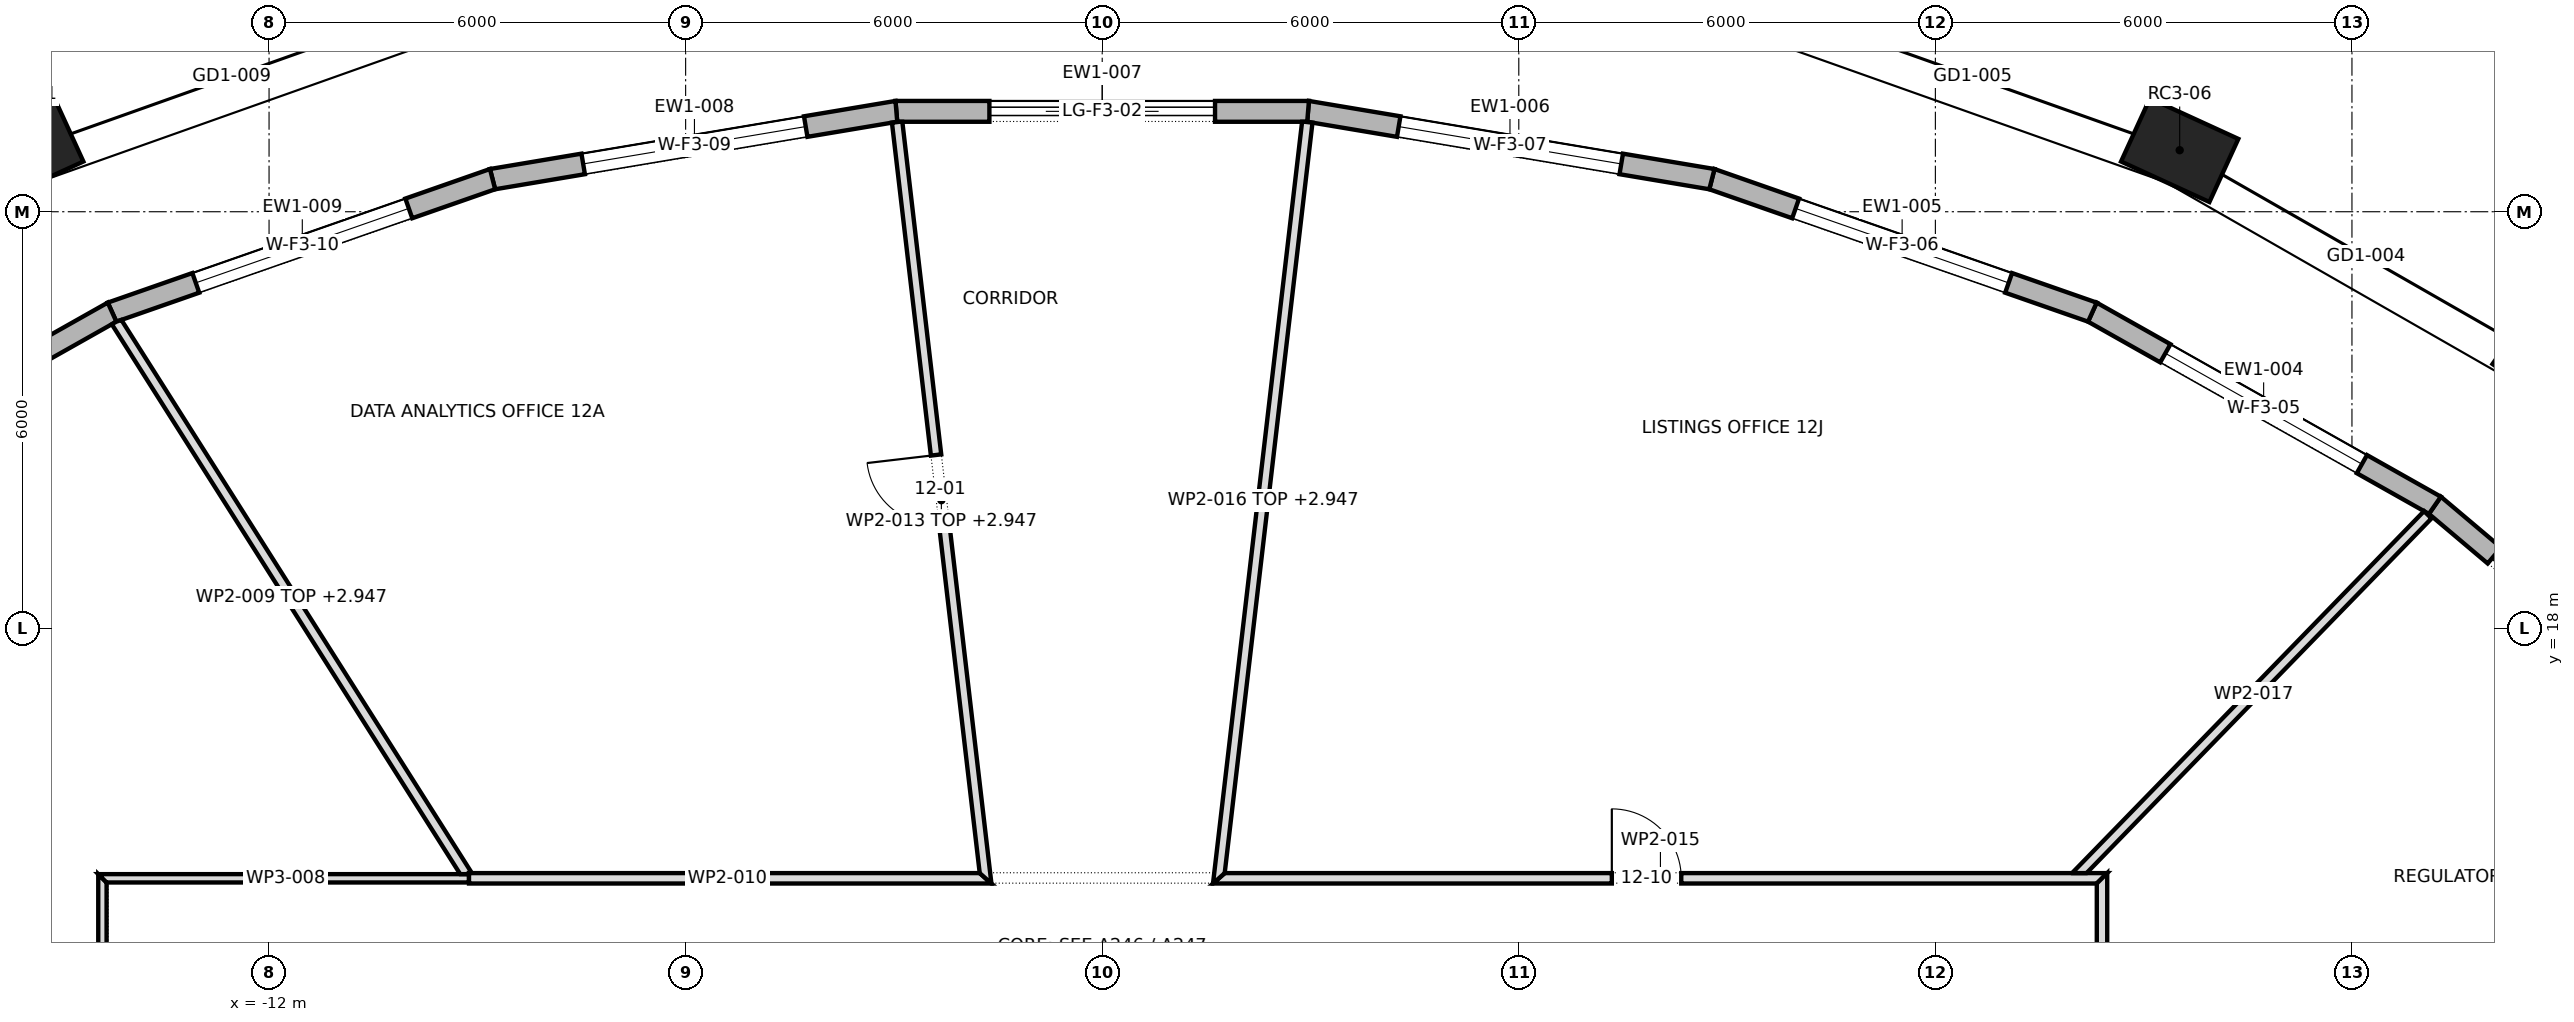
"""IFC4 building model, lengths in metres.
Left out: names, types, materials, properties, quantities, classifications, styles, units other than length and angle.
Written with IfcOpenShell. Run it as: python <this file> out.ifc"""

import sys

from ifc_helpers import new_model, si_unit, direction, frame, frame_2d, origin, origin_2d, place, context, subcontext, project, spatial, polyline, rectangle, outline, extrude, element, fill, save


model = new_model("IFC4")
c1 = context("Model", 3, precision=1e-05, world=origin(), true_north=direction((0.0, 1.0)))
c2 = subcontext(c1, "Body", "Model", "MODEL_VIEW")
j1 = project(units=[si_unit("LENGTHUNIT", "METRE"), si_unit("PLANEANGLEUNIT", "RADIAN")], contexts=[c1])
p1 = place(None, origin())
s1 = spatial("IfcSite", under=j1, at=p1, CompositionType="ELEMENT")
p2 = place(p1, origin())
s2 = spatial("IfcBuilding", under=s1, at=p2, CompositionType="ELEMENT")
p3 = place(p2, frame((0.0, 0.0, 178.9)))
s3 = spatial("IfcBuildingStorey", under=s2, at=p3, CompositionType="ELEMENT", Elevation=178.9)
for number, where, z_axis, x_axis in (
    (1, (20.885, 21.813, 0.0), (0.0, 0.0, 1.0), (-0.818, 0.575, 0.0)),
    (2, (15.519, 24.886, 0.0), (0.0, 0.0, 1.0), (-0.909, 0.417, 0.0)),
    (3, (-15.519, 24.886, 0.0), (0.0, 0.0, 1.0), (-0.909, -0.417, 0.0)),
):
    element("IfcColumn", number, at=place(p3, frame(where, z_axis=z_axis, x_axis=x_axis)), inside=s3, PredefinedType="COLUMN", context=c2, shape_type="SweptSolid", body=[
        extrude(rectangle(XDim=1.4, YDim=1.0, at=origin_2d()), origin(), (0.0, 0.0, 1.0), 4.0),
    ])
p4 = place(p3, frame((23.392, 16.23, 0.0), z_axis=(0.0, 0.0, 1.0), x_axis=(-0.764238764041, 0.64493341636, 0.0)))
e4 = element("IfcWall", 4, at=p4, inside=s3, PredefinedType="STANDARD", context=c2, shape_type="SweptSolid", body=[
    extrude(outline(polyline([(-0.015, -0.15), (5.507, -0.15), (5.478, 0.15), (0.015, 0.15), (-0.015, -0.15)])), origin(), (0.0, 0.0, 1.0), 3.7),
])
p5 = place(p4, frame((1.121, 0.0, 0.0)))
e5 = element("IfcOpeningElement", 5, at=p5, cuts=e4, PredefinedType="OPENING", context=c2, shape_type="SweptSolid", body=[
    extrude(rectangle(XDim=3.25, YDim=3.25, at=frame_2d((1.625, 1.625))), frame((0.0, 0.162, 0.0), z_axis=(0.0, -1.0, 0.0), x_axis=(1.0, 0.0, 0.0)), (0.0, 0.0, 1.0), 0.324),
])
p6 = place(p3, frame((19.195, 19.772, 0.0), z_axis=(0.0, 0.0, 1.0), x_axis=(-0.871077775545, 0.491145099691, 0.0)))
e6 = element("IfcWall", 6, at=p6, inside=s3, PredefinedType="STANDARD", context=c2, shape_type="SweptSolid", body=[
    extrude(outline(polyline([(-0.014, -0.15), (5.677, -0.15), (5.65, 0.15), (0.014, 0.15), (-0.014, -0.15)])), origin(), (0.0, 0.0, 1.0), 3.7),
])
p7 = place(p6, frame((1.207, 0.0, 0.6)))
e7 = element("IfcOpeningElement", 7, at=p7, cuts=e6, PredefinedType="OPENING", context=c2, shape_type="SweptSolid", body=[
    extrude(rectangle(XDim=3.25, YDim=2.65, at=frame_2d((1.625, 1.325))), frame((0.0, 0.162, 0.0), z_axis=(0.0, -1.0, 0.0), x_axis=(1.0, 0.0, 0.0)), (0.0, 0.0, 1.0), 0.324),
])
p8 = place(p3, frame((14.261, 22.554, 0.0), z_axis=(0.0, 0.0, 1.0), x_axis=(-0.943990724372, 0.329971987144, 0.0)))
e8 = element("IfcWall", 8, at=p8, inside=s3, PredefinedType="STANDARD", context=c2, shape_type="SweptSolid", body=[
    extrude(outline(polyline([(-0.013, -0.15), (5.818, -0.15), (5.792, 0.15), (0.013, 0.15), (-0.013, -0.15)])), origin(), (0.0, 0.0, 1.0), 3.7),
])
p9 = place(p8, frame((1.278, 0.0, 0.6)))
e9 = element("IfcOpeningElement", 9, at=p9, cuts=e8, PredefinedType="OPENING", context=c2, shape_type="SweptSolid", body=[
    extrude(rectangle(XDim=3.25, YDim=2.65, at=frame_2d((1.625, 1.325))), frame((0.0, 0.162, 0.0), z_axis=(0.0, -1.0, 0.0), x_axis=(1.0, 0.0, 0.0)), (0.0, 0.0, 1.0), 0.324),
])
p10 = place(p3, frame((8.781, 24.469, 0.0), z_axis=(0.0, 0.0, 1.0), x_axis=(-0.986201934369, 0.165546805001, 0.0)))
e10 = element("IfcWall", 10, at=p10, inside=s3, PredefinedType="STANDARD", context=c2, shape_type="SweptSolid", body=[
    extrude(outline(polyline([(-0.013, -0.15), (5.91, -0.15), (5.885, 0.15), (0.013, 0.15), (-0.013, -0.15)])), origin(), (0.0, 0.0, 1.0), 3.7),
])
p11 = place(p10, frame((1.324, 0.0, 0.6)))
e11 = element("IfcOpeningElement", 11, at=p11, cuts=e10, PredefinedType="OPENING", context=c2, shape_type="SweptSolid", body=[
    extrude(rectangle(XDim=3.25, YDim=2.65, at=frame_2d((1.625, 1.325))), frame((0.0, 0.162, 0.0), z_axis=(0.0, -1.0, 0.0), x_axis=(1.0, 0.0, 0.0)), (0.0, 0.0, 1.0), 0.324),
])
p12 = place(p3, frame((2.965, 25.446, 0.0), z_axis=(0.0, 0.0, 1.0), x_axis=(-1.0, 0.0, 0.0)))
e12 = element("IfcWall", 12, at=p12, inside=s3, PredefinedType="STANDARD", context=c2, shape_type="SweptSolid", body=[
    extrude(outline(polyline([(-0.012, -0.15), (5.942, -0.15), (5.917, 0.15), (0.012, 0.15), (-0.012, -0.15)])), origin(), (0.0, 0.0, 1.0), 3.7),
])
p13 = place(p12, frame((1.34, 0.0, 0.0)))
e13 = element("IfcOpeningElement", 13, at=p13, cuts=e12, PredefinedType="OPENING", context=c2, shape_type="SweptSolid", body=[
    extrude(rectangle(XDim=3.25, YDim=3.25, at=frame_2d((1.625, 1.625))), frame((0.0, 0.162, 0.0), z_axis=(0.0, -1.0, 0.0), x_axis=(1.0, 0.0, 0.0)), (0.0, 0.0, 1.0), 0.324),
])
p14 = place(p3, frame((-2.965, 25.446, 0.0), z_axis=(0.0, 0.0, 1.0), x_axis=(-0.986201934369, -0.165546805001, 0.0)))
e14 = element("IfcWall", 14, at=p14, inside=s3, PredefinedType="STANDARD", context=c2, shape_type="SweptSolid", body=[
    extrude(outline(polyline([(-0.012, -0.15), (5.91, -0.15), (5.885, 0.15), (0.012, 0.15), (-0.012, -0.15)])), origin(), (0.0, 0.0, 1.0), 3.7),
])
p15 = place(p14, frame((1.324, 0.0, 0.6)))
e15 = element("IfcOpeningElement", 15, at=p15, cuts=e14, PredefinedType="OPENING", context=c2, shape_type="SweptSolid", body=[
    extrude(rectangle(XDim=3.25, YDim=2.65, at=frame_2d((1.625, 1.325))), frame((0.0, 0.162, 0.0), z_axis=(0.0, -1.0, 0.0), x_axis=(1.0, 0.0, 0.0)), (0.0, 0.0, 1.0), 0.324),
])
p16 = place(p3, frame((-8.781, 24.469, 0.0), z_axis=(0.0, 0.0, 1.0), x_axis=(-0.943990724372, -0.329971987144, 0.0)))
e16 = element("IfcWall", 16, at=p16, inside=s3, PredefinedType="STANDARD", context=c2, shape_type="SweptSolid", body=[
    extrude(outline(polyline([(-0.013, -0.15), (5.819, -0.15), (5.792, 0.15), (0.013, 0.15), (-0.013, -0.15)])), origin(), (0.0, 0.0, 1.0), 3.7),
])
p17 = place(p16, frame((1.278, 0.0, 0.6)))
e17 = element("IfcOpeningElement", 17, at=p17, cuts=e16, PredefinedType="OPENING", context=c2, shape_type="SweptSolid", body=[
    extrude(rectangle(XDim=3.25, YDim=2.65, at=frame_2d((1.625, 1.325))), frame((0.0, 0.162, 0.0), z_axis=(0.0, -1.0, 0.0), x_axis=(1.0, 0.0, 0.0)), (0.0, 0.0, 1.0), 0.324),
])
p18 = place(p3, frame((-14.261, 22.554, 0.0), z_axis=(0.0, 0.0, 1.0), x_axis=(-0.871077775545, -0.491145099691, 0.0)))
e18 = element("IfcWall", 18, at=p18, inside=s3, PredefinedType="STANDARD", context=c2, shape_type="SweptSolid", body=[
    extrude(outline(polyline([(-0.013, -0.15), (5.678, -0.15), (5.65, 0.15), (0.013, 0.15), (-0.013, -0.15)])), origin(), (0.0, 0.0, 1.0), 3.7),
])
p19 = place(p18, frame((1.207, 0.0, 0.6)))
e19 = element("IfcOpeningElement", 19, at=p19, cuts=e18, PredefinedType="OPENING", context=c2, shape_type="SweptSolid", body=[
    extrude(rectangle(XDim=3.25, YDim=2.65, at=frame_2d((1.625, 1.325))), frame((0.0, 0.162, 0.0), z_axis=(0.0, -1.0, 0.0), x_axis=(1.0, 0.0, 0.0)), (0.0, 0.0, 1.0), 0.324),
])
p20 = place(p3, frame((-14.4, 6.5, 0.0), z_axis=(0.0, 0.0, 1.0), x_axis=(0.0, 1.0, 0.0)))
e20 = element("IfcWall", 20, at=p20, inside=s3, PredefinedType="PARTITIONING", context=c2, shape_type="SweptSolid", body=[
    extrude(outline(polyline([(0.0, -0.06), (1.96, -0.06), (3.92, -0.06), (5.88, -0.06), (7.84, -0.06), (7.96, 0.06), (5.97, 0.06), (3.98, 0.06), (1.99, 0.06), (0.0, 0.06), (0.0, -0.06)])), origin(), (0.0, 0.0, 1.0), 3.7),
])
p21 = place(p20, frame((3.45, 0.0, 0.0)))
e21 = element("IfcOpeningElement", 21, at=p21, cuts=e20, PredefinedType="OPENING", context=c2, shape_type="SweptSolid", body=[
    extrude(rectangle(XDim=1.0, YDim=2.1, at=frame_2d((0.5, 1.05))), frame((0.0, 0.072, 0.0), z_axis=(0.0, -1.0, 0.0), x_axis=(1.0, 0.0, 0.0)), (0.0, 0.0, 1.0), 0.144),
])
p22 = place(p3, frame((-14.46, 14.4, 0.0), z_axis=(0.0, 0.0, 1.0), x_axis=(1.0, 0.0, 0.0)))
e22 = element("IfcWall", 22, at=p22, inside=s3, PredefinedType="PARTITIONING", context=c2, shape_type="SweptSolid", body=[
    extrude(outline(polyline([(5.34, 0.06), (3.56, 0.06), (1.78, 0.06), (0.0, 0.06), (0.12, -0.06), (1.86, -0.06), (3.6, -0.06), (5.34, -0.06), (5.34, 0.06)])), origin(), (0.0, 0.0, 1.0), 3.7),
])
p23 = place(p3, frame((-9.142, 14.435, 0.0), z_axis=(0.0, 0.0, 1.0), x_axis=(-0.535245013247, 0.844696854377, 0.0)))
e23 = element("IfcWall", 23, at=p23, inside=s3, PredefinedType="PARTITIONING", context=c2, shape_type="SweptSolid", body=[
    extrude(outline(polyline([(0.0, -0.075), (1.886, -0.075), (3.773, -0.075), (5.659, -0.075), (7.545, -0.075), (9.432, -0.075), (9.449, -0.001), (9.452, 0.069), (9.452, 0.075), (7.577, 0.075), (5.702, 0.075), (3.827, 0.075), (1.952, 0.075), (0.077, 0.075), (0.009, -0.032), (0.022, -0.04), (0.0, -0.075), (0.0, -0.075)])), origin(), (0.0, 0.0, 1.0), 2.947),
])
p24 = place(p3, frame((-9.12, 14.4, 0.0), z_axis=(0.0, 0.0, 1.0), x_axis=(1.0, 0.0, 0.0)))
e24 = element("IfcWall", 24, at=p24, inside=s3, PredefinedType="PARTITIONING", context=c2, shape_type="SweptSolid", body=[
    extrude(outline(polyline([(7.524, -0.075), (7.524, -0.075), (7.356, 0.075), (5.517, 0.075), (3.678, 0.075), (1.839, 0.075), (0.0, 0.075), (0.0, -0.075), (1.881, -0.075), (3.762, -0.075), (5.643, -0.075), (7.524, -0.075)])), origin(), (0.0, 0.0, 1.0), 3.7),
])
p25 = place(p3, frame((-1.67, 14.316, 0.0), z_axis=(0.0, 0.0, 1.0), x_axis=(-0.116172056535, 0.993229104125, 0.0)))
e25 = element("IfcWall", 25, at=p25, inside=s3, PredefinedType="PARTITIONING", context=c2, shape_type="SweptSolid", body=[
    extrude(outline(polyline([(0.0, -0.075), (1.841, -0.075), (3.682, -0.075), (5.523, -0.075), (7.364, -0.075), (9.205, -0.075), (11.045, -0.075), (11.05, -0.037), (11.05, 0.075), (9.236, 0.075), (7.423, 0.075), (5.609, 0.075), (3.795, 0.075), (1.982, 0.075), (0.168, 0.075), (0.084, 0.0), (0.0, -0.075), (0.0, -0.075)])), origin(), (0.0, 0.0, 1.0), 2.947),
])
p26 = place(p25, frame((5.222, 0.0, 0.0)))
e26 = element("IfcOpeningElement", 26, at=p26, cuts=e25, PredefinedType="OPENING", context=c2, shape_type="SweptSolid", body=[
    extrude(rectangle(XDim=1.0, YDim=2.1, at=frame_2d((0.5, 1.05))), frame((0.0, 0.087, 0.0), z_axis=(0.0, -1.0, 0.0), x_axis=(1.0, 0.0, 0.0)), (0.0, 0.0, 1.0), 0.174),
])
p27 = place(p3, frame((1.596, 14.4, 0.0), z_axis=(0.0, 0.0, 1.0), x_axis=(1.0, 0.0, 0.0)))
e27 = element("IfcWall", 27, at=p27, inside=s3, PredefinedType="PARTITIONING", context=c2, shape_type="SweptSolid", body=[
    extrude(outline(polyline([(0.0, -0.075), (1.818, -0.075), (3.637, -0.075), (5.455, -0.075), (7.274, -0.075), (9.092, -0.075), (10.911, -0.075), (12.729, -0.075), (12.879, 0.075), (11.063, 0.075), (9.248, 0.075), (7.432, 0.075), (5.616, 0.075), (3.8, 0.075), (1.984, 0.075), (0.168, 0.075), (0.0, -0.075), (0.0, -0.075)])), origin(), (0.0, 0.0, 1.0), 3.7),
])
p28 = place(p27, frame((5.744, 0.0, 0.0)))
e28 = element("IfcOpeningElement", 28, at=p28, cuts=e27, PredefinedType="OPENING", context=c2, shape_type="SweptSolid", body=[
    extrude(rectangle(XDim=1.0, YDim=2.1, at=frame_2d((0.5, 1.05))), frame((0.0, 0.087, 0.0), z_axis=(0.0, -1.0, 0.0), x_axis=(1.0, 0.0, 0.0)), (0.0, 0.0, 1.0), 0.174),
])
p29 = place(p3, frame((2.954, 25.292, 0.0), z_axis=(0.0, 0.0, 1.0), x_axis=(-0.116172056535, -0.993229104125, 0.0)))
e29 = element("IfcWall", 29, at=p29, inside=s3, PredefinedType="PARTITIONING", context=c2, shape_type="SweptSolid", body=[
    extrude(outline(polyline([(11.05, -0.075), (11.05, -0.075), (10.966, 0.0), (10.882, 0.075), (9.068, 0.075), (7.254, 0.075), (5.441, 0.075), (3.627, 0.075), (1.813, 0.075), (0.0, 0.075), (0.0, -0.036), (0.005, -0.075), (1.845, -0.075), (3.686, -0.075), (5.527, -0.075), (7.368, -0.075), (9.209, -0.075), (11.05, -0.075)])), origin(), (0.0, 0.0, 1.0), 2.947),
])
p30 = place(p3, frame((14.022, 14.423, 0.0), z_axis=(0.0, 0.0, 1.0), x_axis=(0.69721790069, 0.716859260216, 0.0)))
e30 = element("IfcWall", 30, at=p30, inside=s3, PredefinedType="PARTITIONING", context=c2, shape_type="SweptSolid", body=[
    extrude(outline(polyline([(0.0, 0.075), (0.0, 0.075), (0.146, -0.075), (1.927, -0.075), (3.708, -0.075), (5.49, -0.075), (7.271, -0.075), (7.271, 0.075), (5.454, 0.075), (3.636, 0.075), (1.818, 0.075), (0.0, 0.075)])), origin(), (0.0, 0.0, 1.0), 3.7),
])
p31 = place(p3, frame((14.4, 1.118, 0.0), z_axis=(0.0, 0.0, 1.0), x_axis=(0.0, 1.0, 0.0)))
e31 = element("IfcWall", 31, at=p31, inside=s3, PredefinedType="PARTITIONING", context=c2, shape_type="SweptSolid", body=[
    extrude(outline(polyline([(0.163, -0.075), (2.048, -0.075), (3.933, -0.075), (5.817, -0.075), (7.702, -0.075), (9.587, -0.075), (11.472, -0.075), (13.356, -0.075), (13.207, 0.075), (11.32, 0.075), (9.433, 0.075), (7.547, 0.075), (5.66, 0.075), (3.773, 0.075), (1.887, 0.075), (0.0, 0.075), (0.163, -0.075)])), origin(), (0.0, 0.0, 1.0), 3.7),
])
p32 = place(p31, frame((8.832, 0.0, 0.0)))
e32 = element("IfcOpeningElement", 32, at=p32, cuts=e31, PredefinedType="OPENING", context=c2, shape_type="SweptSolid", body=[
    extrude(rectangle(XDim=1.0, YDim=2.1, at=frame_2d((0.5, 1.05))), frame((0.0, 0.087, 0.0), z_axis=(0.0, -1.0, 0.0), x_axis=(1.0, 0.0, 0.0)), (0.0, 0.0, 1.0), 0.174),
])
p33 = place(p5, origin())
e33 = element("IfcDoor", 33, at=p33, inside=s3, OperationType="DOUBLE_DOOR_SLIDING", PredefinedType="DOOR", context=c2, shape_type="SweptSolid", body=[
    extrude(rectangle(XDim=3.25, YDim=3.25, at=frame_2d((1.625, 1.625))), frame((0.0, 0.025, 0.0), z_axis=(0.0, -1.0, 0.0), x_axis=(1.0, 0.0, 0.0)), (0.0, 0.0, 1.0), 0.05),
])
fill(e5, e33)
p34 = place(p7, origin())
e34 = element("IfcWindow", 34, at=p34, inside=s3, PartitioningType="TRIPLE_PANEL_VERTICAL", PredefinedType="WINDOW", context=c2, shape_type="SweptSolid", body=[
    extrude(rectangle(XDim=3.25, YDim=2.65, at=frame_2d((1.625, 1.325))), frame((0.0, 0.03, 0.0), z_axis=(0.0, -1.0, 0.0), x_axis=(1.0, 0.0, 0.0)), (0.0, 0.0, 1.0), 0.06),
])
fill(e7, e34)
p35 = place(p9, origin())
e35 = element("IfcWindow", 35, at=p35, inside=s3, PartitioningType="TRIPLE_PANEL_VERTICAL", PredefinedType="WINDOW", context=c2, shape_type="SweptSolid", body=[
    extrude(rectangle(XDim=3.25, YDim=2.65, at=frame_2d((1.625, 1.325))), frame((0.0, 0.03, 0.0), z_axis=(0.0, -1.0, 0.0), x_axis=(1.0, 0.0, 0.0)), (0.0, 0.0, 1.0), 0.06),
])
fill(e9, e35)
p36 = place(p11, origin())
e36 = element("IfcWindow", 36, at=p36, inside=s3, PartitioningType="TRIPLE_PANEL_VERTICAL", PredefinedType="WINDOW", context=c2, shape_type="SweptSolid", body=[
    extrude(rectangle(XDim=3.25, YDim=2.65, at=frame_2d((1.625, 1.325))), frame((0.0, 0.03, 0.0), z_axis=(0.0, -1.0, 0.0), x_axis=(1.0, 0.0, 0.0)), (0.0, 0.0, 1.0), 0.06),
])
fill(e11, e36)
p37 = place(p13, origin())
e37 = element("IfcDoor", 37, at=p37, inside=s3, OperationType="DOUBLE_DOOR_SLIDING", PredefinedType="DOOR", context=c2, shape_type="SweptSolid", body=[
    extrude(rectangle(XDim=3.25, YDim=3.25, at=frame_2d((1.625, 1.625))), frame((0.0, 0.025, 0.0), z_axis=(0.0, -1.0, 0.0), x_axis=(1.0, 0.0, 0.0)), (0.0, 0.0, 1.0), 0.05),
])
fill(e13, e37)
p38 = place(p15, origin())
e38 = element("IfcWindow", 38, at=p38, inside=s3, PartitioningType="TRIPLE_PANEL_VERTICAL", PredefinedType="WINDOW", context=c2, shape_type="SweptSolid", body=[
    extrude(rectangle(XDim=3.25, YDim=2.65, at=frame_2d((1.625, 1.325))), frame((0.0, 0.03, 0.0), z_axis=(0.0, -1.0, 0.0), x_axis=(1.0, 0.0, 0.0)), (0.0, 0.0, 1.0), 0.06),
])
fill(e15, e38)
p39 = place(p17, origin())
e39 = element("IfcWindow", 39, at=p39, inside=s3, PartitioningType="TRIPLE_PANEL_VERTICAL", PredefinedType="WINDOW", context=c2, shape_type="SweptSolid", body=[
    extrude(rectangle(XDim=3.25, YDim=2.65, at=frame_2d((1.625, 1.325))), frame((0.0, 0.03, 0.0), z_axis=(0.0, -1.0, 0.0), x_axis=(1.0, 0.0, 0.0)), (0.0, 0.0, 1.0), 0.06),
])
fill(e17, e39)
p40 = place(p26, origin())
e40 = element("IfcDoor", 40, at=p40, inside=s3, OperationType="SINGLE_SWING_LEFT", PredefinedType="DOOR", context=c2, shape_type="SweptSolid", body=[
    extrude(rectangle(XDim=1.0, YDim=2.1, at=frame_2d((0.5, 1.05))), frame((0.0, 0.025, 0.0), z_axis=(0.0, -1.0, 0.0), x_axis=(1.0, 0.0, 0.0)), (0.0, 0.0, 1.0), 0.05),
])
fill(e26, e40)
p41 = place(p28, origin())
e41 = element("IfcDoor", 41, at=p41, inside=s3, OperationType="SINGLE_SWING_RIGHT", PredefinedType="DOOR", context=c2, shape_type="SweptSolid", body=[
    extrude(rectangle(XDim=1.0, YDim=2.1, at=frame_2d((0.5, 1.05))), frame((0.0, 0.025, 0.0), z_axis=(0.0, -1.0, 0.0), x_axis=(1.0, 0.0, 0.0)), (0.0, 0.0, 1.0), 0.05),
])
fill(e28, e41)
save(model, sys.argv[1])
